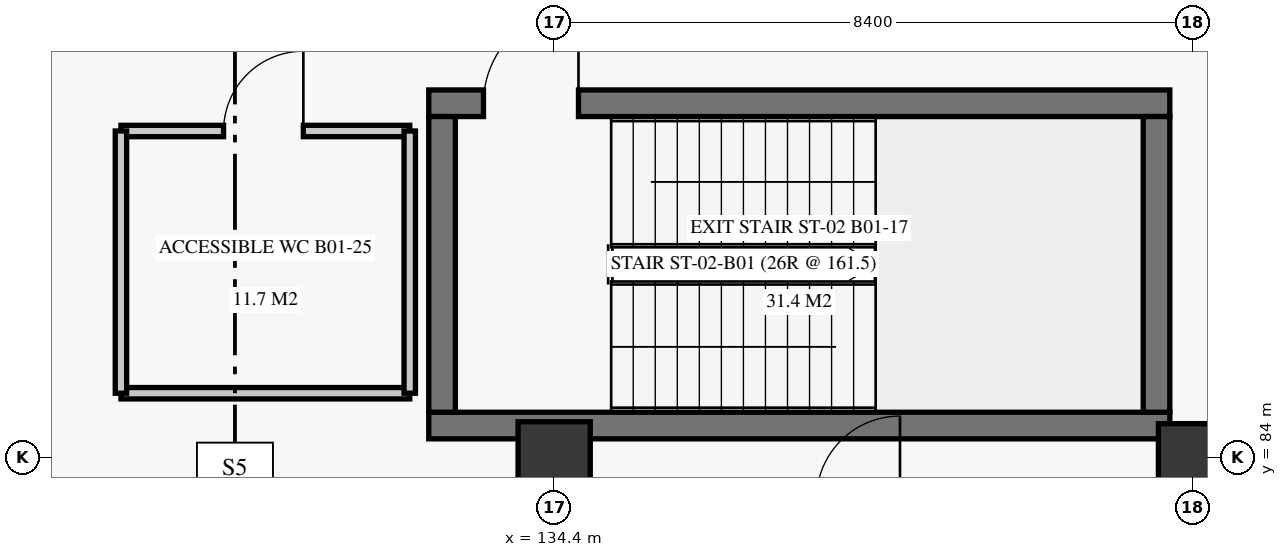
"""IFC4 building model, lengths in metres.
Left out: names, types, materials, properties, quantities, classifications, styles, units other than length and angle.
Written with IfcOpenShell. Run it as: python <this file> out.ifc"""

import sys

from ifc_helpers import new_model, si_unit, direction, frame, frame_2d, origin, origin_2d, place, context, subcontext, project, spatial, rectangle, extrude, element, fill, save


model = new_model("IFC4")
c1 = context("Model", 3, precision=1e-05, world=origin(), true_north=direction((0.0, 1.0)))
c2 = subcontext(c1, "Body", "Model", "MODEL_VIEW")
j1 = project(units=[si_unit("LENGTHUNIT", "METRE"), si_unit("PLANEANGLEUNIT", "RADIAN")], contexts=[c1])
p1 = place(None, origin())
s1 = spatial("IfcSite", under=j1, at=p1, CompositionType="ELEMENT")
p2 = place(p1, origin())
s2 = spatial("IfcBuilding", under=s1, at=p2, CompositionType="ELEMENT")
p3 = place(p2, frame((0.0, 0.0, -4.2)))
s3 = spatial("IfcBuildingStorey", under=s2, at=p3, CompositionType="ELEMENT", Elevation=-4.2)
p4 = place(p3, frame((134.4, 84.0, 0.0), z_axis=(0.0, 0.0, 1.0), x_axis=(1.0, 0.0, 0.0)))
e1 = element("IfcColumn", 1, at=p4, inside=s3, PredefinedType="COLUMN", context=c2, shape_type="SweptSolid", body=[
    extrude(rectangle(XDim=0.95, YDim=0.95, at=origin_2d()), origin(), (0.0, 0.0, 1.0), 3.88),
])
p5 = place(p3, frame((142.8, 84.0, 0.0), z_axis=(0.0, 0.0, 1.0), x_axis=(1.0, 0.0, 0.0)))
e2 = element("IfcColumn", 2, at=p5, inside=s3, PredefinedType="COLUMN", context=c2, shape_type="SweptSolid", body=[
    extrude(rectangle(XDim=0.9, YDim=0.9, at=origin_2d()), origin(), (0.0, 0.0, 1.0), 3.88),
])
p6 = place(p3, frame((132.75, 84.425, 0.0), z_axis=(0.0, 0.0, 1.0), x_axis=(1.0, 0.0, 0.0)))
e3 = element("IfcWall", 3, at=p6, inside=s3, PredefinedType="SHEAR", context=c2, shape_type="SweptSolid", body=[
    extrude(rectangle(XDim=9.75, YDim=0.35, at=frame_2d((4.875, 0.0))), origin(), (0.0, 0.0, 1.0), 3.88),
])
p7 = place(p3, frame((132.75, 88.665, 0.0), z_axis=(0.0, 0.0, 1.0), x_axis=(1.0, 0.0, 0.0)))
e4 = element("IfcWall", 4, at=p7, inside=s3, PredefinedType="SHEAR", context=c2, shape_type="SweptSolid", body=[
    extrude(rectangle(XDim=9.75, YDim=0.35, at=frame_2d((4.875, 0.0))), origin(), (0.0, 0.0, 1.0), 3.88),
])
p8 = place(p7, frame((0.72, 0.0, 0.0)))
e5 = element("IfcOpeningElement", 5, at=p8, cuts=e4, PredefinedType="OPENING", context=c2, shape_type="SweptSolid", body=[
    extrude(rectangle(XDim=1.25, YDim=2.2, at=frame_2d((0.625, 1.1))), frame((0.0, 0.185, 0.0), z_axis=(0.0, -1.0, 0.0), x_axis=(1.0, 0.0, 0.0)), (0.0, 0.0, 1.0), 0.37),
])
for number, where, z_axis, x_axis in (
    (6, (132.925, 84.6, 0.0), (0.0, 0.0, 1.0), (0.0, 1.0, 0.0)),
    (7, (142.325, 84.6, 0.0), (0.0, 0.0, 1.0), (0.0, 1.0, 0.0)),
):
    element("IfcWall", number, at=place(p3, frame(where, z_axis=z_axis, x_axis=x_axis)), inside=s3, PredefinedType="SHEAR", context=c2, shape_type="SweptSolid", body=[
        extrude(rectangle(XDim=3.89, YDim=0.35, at=frame_2d((1.945, 0.0))), origin(), (0.0, 0.0, 1.0), 3.88),
    ])
p9 = place(p3, frame((128.7, 88.3, 0.0), z_axis=(0.0, 0.0, 1.0), x_axis=(1.0, 0.0, 0.0)))
e8 = element("IfcWall", 8, at=p9, inside=s3, PredefinedType="PARTITIONING", context=c2, shape_type="SweptSolid", body=[
    extrude(rectangle(XDim=3.8, YDim=0.15, at=frame_2d((1.9, 0.0))), origin(), (0.0, 0.0, 1.0), 3.5),
])
p10 = place(p9, frame((1.35, 0.0, 0.0)))
e9 = element("IfcOpeningElement", 9, at=p10, cuts=e8, PredefinedType="OPENING", context=c2, shape_type="SweptSolid", body=[
    extrude(rectangle(XDim=1.05, YDim=2.15, at=frame_2d((0.525, 1.075))), frame((0.0, 0.085, 0.0), z_axis=(0.0, -1.0, 0.0), x_axis=(1.0, 0.0, 0.0)), (0.0, 0.0, 1.0), 0.17),
])
p11 = place(p3, frame((128.7, 84.85, 0.0), z_axis=(0.0, 0.0, 1.0), x_axis=(1.0, 0.0, 0.0)))
e10 = element("IfcWall", 10, at=p11, inside=s3, PredefinedType="PARTITIONING", context=c2, shape_type="SweptSolid", body=[
    extrude(rectangle(XDim=3.8, YDim=0.15, at=frame_2d((1.9, 0.0))), origin(), (0.0, 0.0, 1.0), 3.5),
])
for number, where, z_axis, x_axis in (
    (11, (128.7, 84.85, 0.0), (0.0, 0.0, 1.0), (0.0, 1.0, 0.0)),
    (12, (132.5, 84.85, 0.0), (0.0, 0.0, 1.0), (0.0, 1.0, 0.0)),
):
    element("IfcWall", number, at=place(p3, frame(where, z_axis=z_axis, x_axis=x_axis)), inside=s3, PredefinedType="PARTITIONING", context=c2, shape_type="SweptSolid", body=[
        extrude(rectangle(XDim=3.45, YDim=0.15, at=frame_2d((1.725, 0.0))), origin(), (0.0, 0.0, 1.0), 3.5),
    ])
p12 = place(p8, origin())
e13 = element("IfcDoor", 13, at=p12, inside=s3, OperationType="SINGLE_SWING_RIGHT", PredefinedType="DOOR", context=c2, shape_type="SweptSolid", body=[
    extrude(rectangle(XDim=1.25, YDim=2.2, at=frame_2d((0.625, 1.1))), frame((0.0, 0.025, 0.0), z_axis=(0.0, -1.0, 0.0), x_axis=(1.0, 0.0, 0.0)), (0.0, 0.0, 1.0), 0.05),
])
fill(e5, e13)
p13 = place(p10, origin())
e14 = element("IfcDoor", 14, at=p13, inside=s3, OperationType="SINGLE_SWING_RIGHT", PredefinedType="DOOR", context=c2, shape_type="SweptSolid", body=[
    extrude(rectangle(XDim=1.05, YDim=2.15, at=frame_2d((0.525, 1.075))), frame((0.0, 0.025, 0.0), z_axis=(0.0, -1.0, 0.0), x_axis=(1.0, 0.0, 0.0)), (0.0, 0.0, 1.0), 0.05),
])
fill(e9, e14)
save(model, sys.argv[1])
